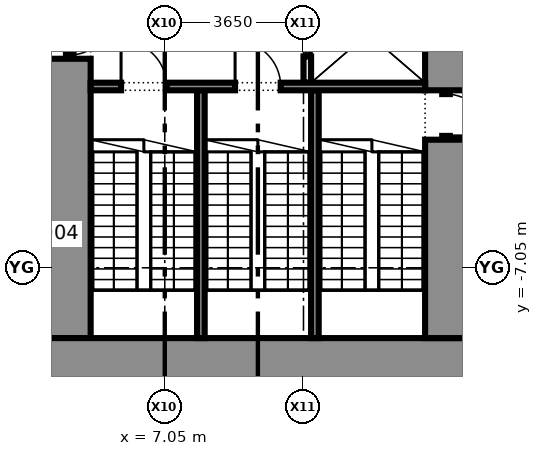
"""IFC4 building model, lengths in metres.
Left out: names, types, materials, properties, quantities, classifications, styles, units other than length and angle.
Written with IfcOpenShell. Run it as: python <this file> out.ifc"""

import sys

from ifc_helpers import new_model, si_unit, direction, frame, frame_2d, origin, place, context, subcontext, project, spatial, rectangle, extrude, element, fill, save


model = new_model("IFC4")
c1 = context("Model", 3, precision=1e-05, world=origin(), true_north=direction((0.0, 1.0)))
c2 = subcontext(c1, "Body", "Model", "MODEL_VIEW")
j1 = project(units=[si_unit("LENGTHUNIT", "METRE"), si_unit("PLANEANGLEUNIT", "RADIAN")], contexts=[c1])
p1 = place(None, origin())
s1 = spatial("IfcSite", under=j1, at=p1, CompositionType="ELEMENT")
p2 = place(p1, origin())
s2 = spatial("IfcBuilding", under=s1, at=p2, CompositionType="ELEMENT")
p3 = place(p2, frame((0.0, 0.0, 6.5)))
s3 = spatial("IfcBuildingStorey", under=s2, at=p3, CompositionType="ELEMENT", Elevation=6.5)
p4 = place(p3, frame((15.0, -9.45, 0.0), z_axis=(0.0, 0.0, 1.0), x_axis=(-1.0, 0.0, 0.0)))
e1 = element("IfcWall", 1, at=p4, inside=s3, PredefinedType="SHEAR", context=c2, shape_type="SweptSolid", body=[
    extrude(rectangle(XDim=11.0, YDim=1.1, at=frame_2d((5.5, 0.0))), origin(), (0.0, 0.0, 1.0), 4.575),
])
p5 = place(p3, frame((14.45, 3.75, 0.0), z_axis=(0.0, 0.0, 1.0), x_axis=(0.0, -1.0, 0.0)))
e2 = element("IfcWall", 2, at=p5, inside=s3, PredefinedType="SHEAR", context=c2, shape_type="SweptSolid", body=[
    extrude(rectangle(XDim=6.13, YDim=1.1, at=frame_2d((3.065, 0.0))), origin(), (0.0, 0.0, 1.0), 4.575),
])
p6 = place(p3, frame((14.45, -2.38, 0.0), z_axis=(0.0, 0.0, 1.0), x_axis=(0.0, -1.0, 0.0)))
e3 = element("IfcWall", 3, at=p6, inside=s3, PredefinedType="SHEAR", context=c2, shape_type="SweptSolid", body=[
    extrude(rectangle(XDim=1.3, YDim=0.2, at=frame_2d((0.65, 0.0))), origin(), (0.0, 0.0, 1.0), 2.4),
])
p7 = place(p6, frame((0.1, 0.0, 0.0)))
e4 = element("IfcOpeningElement", 4, at=p7, cuts=e3, PredefinedType="OPENING", context=c2, shape_type="SweptSolid", body=[
    extrude(rectangle(XDim=1.1, YDim=2.1, at=frame_2d((0.55, 1.05))), frame((0.0, 0.11, 0.0), z_axis=(0.0, -1.0, 0.0), x_axis=(1.0, 0.0, 0.0)), (0.0, 0.0, 1.0), 0.22),
])
p8 = place(p3, frame((14.45, -3.68, 0.0), z_axis=(0.0, 0.0, 1.0), x_axis=(0.0, -1.0, 0.0)))
e5 = element("IfcWall", 5, at=p8, inside=s3, PredefinedType="SHEAR", context=c2, shape_type="SweptSolid", body=[
    extrude(rectangle(XDim=5.22, YDim=1.1, at=frame_2d((2.61, 0.0))), origin(), (0.0, 0.0, 1.0), 4.575),
])
p9 = place(p3, frame((4.55, -0.25, 0.0), z_axis=(0.0, 0.0, 1.0), x_axis=(0.0, -1.0, 0.0)))
e6 = element("IfcWall", 6, at=p9, inside=s3, PredefinedType="PARTITIONING", context=c2, shape_type="SweptSolid", body=[
    extrude(rectangle(XDim=1.3, YDim=0.2, at=frame_2d((0.65, 0.0))), origin(), (0.0, 0.0, 1.0), 2.4),
])
p10 = place(p9, frame((0.1, 0.0, 0.0)))
e7 = element("IfcOpeningElement", 7, at=p10, cuts=e6, PredefinedType="OPENING", context=c2, shape_type="SweptSolid", body=[
    extrude(rectangle(XDim=1.1, YDim=2.1, at=frame_2d((0.55, 1.05))), frame((0.0, 0.11, 0.0), z_axis=(0.0, -1.0, 0.0), x_axis=(1.0, 0.0, 0.0)), (0.0, 0.0, 1.0), 0.22),
])
p11 = place(p3, frame((4.55, -1.55, 0.0), z_axis=(0.0, 0.0, 1.0), x_axis=(0.0, -1.0, 0.0)))
e8 = element("IfcWall", 8, at=p11, inside=s3, PredefinedType="SHEAR", context=c2, shape_type="SweptSolid", body=[
    extrude(rectangle(XDim=7.35, YDim=1.1, at=frame_2d((3.675, 0.0))), origin(), (0.0, 0.0, 1.0), 4.575),
])
p12 = place(p3, frame((10.8, 0.4, 0.0), z_axis=(0.0, 0.0, 1.0), x_axis=(0.0, -1.0, 0.0)))
e9 = element("IfcWall", 9, at=p12, inside=s3, PredefinedType="PARTITIONING", context=c2, shape_type="SweptSolid", body=[
    extrude(rectangle(XDim=2.58, YDim=0.2, at=frame_2d((1.29, 0.0))), origin(), (0.0, 0.0, 1.0), 4.575),
])
p13 = place(p12, frame((0.69, 0.0, 0.0)))
e10 = element("IfcOpeningElement", 10, at=p13, cuts=e9, PredefinedType="OPENING", context=c2, shape_type="SweptSolid", body=[
    extrude(rectangle(XDim=1.2, YDim=2.1, at=frame_2d((0.6, 1.05))), frame((0.0, 0.11, 0.0), z_axis=(0.0, -1.0, 0.0), x_axis=(1.0, 0.0, 0.0)), (0.0, 0.0, 1.0), 0.22),
])
p14 = place(p3, frame((13.9, -2.28, 0.0), z_axis=(0.0, 0.0, 1.0), x_axis=(-1.0, 0.0, 0.0)))
e11 = element("IfcWall", 11, at=p14, inside=s3, PredefinedType="SHEAR", context=c2, shape_type="SweptSolid", body=[
    extrude(rectangle(XDim=8.8, YDim=0.2, at=frame_2d((4.4, 0.0))), origin(), (0.0, 0.0, 1.0), 4.575),
])
p15 = place(p14, frame((3.8, 0.0, 0.0)))
e12 = element("IfcOpeningElement", 12, at=p15, cuts=e11, PredefinedType="OPENING", context=c2, shape_type="SweptSolid", body=[
    extrude(rectangle(XDim=1.2, YDim=2.1, at=frame_2d((0.6, 1.05))), frame((0.0, 0.11, 0.0), z_axis=(0.0, -1.0, 0.0), x_axis=(1.0, 0.0, 0.0)), (0.0, 0.0, 1.0), 0.22),
])
p16 = place(p14, frame((6.8, 0.0, 0.0)))
e13 = element("IfcOpeningElement", 13, at=p16, cuts=e11, PredefinedType="OPENING", context=c2, shape_type="SweptSolid", body=[
    extrude(rectangle(XDim=1.2, YDim=2.1, at=frame_2d((0.6, 1.05))), frame((0.0, 0.11, 0.0), z_axis=(0.0, -1.0, 0.0), x_axis=(1.0, 0.0, 0.0)), (0.0, 0.0, 1.0), 0.22),
])
for number, where, z_axis, x_axis in (
    (14, (11.0, -2.38, 0.0), (0.0, 0.0, 1.0), (0.0, -1.0, 0.0)),
    (15, (8.0, -2.38, 0.0), (0.0, 0.0, 1.0), (0.0, -1.0, 0.0)),
):
    element("IfcWall", number, at=place(p3, frame(where, z_axis=z_axis, x_axis=x_axis)), inside=s3, PredefinedType="SHEAR", context=c2, shape_type="SweptSolid", body=[
        extrude(rectangle(XDim=6.52, YDim=0.2, at=frame_2d((3.26, 0.0))), origin(), (0.0, 0.0, 1.0), 4.575),
    ])
p17 = place(p7, origin())
e16 = element("IfcDoor", 16, at=p17, inside=s3, OperationType="SINGLE_SWING_RIGHT", PredefinedType="DOOR", context=c2, shape_type="SweptSolid", body=[
    extrude(rectangle(XDim=1.1, YDim=2.1, at=frame_2d((0.55, 1.05))), frame((0.0, 0.025, 0.0), z_axis=(0.0, -1.0, 0.0), x_axis=(1.0, 0.0, 0.0)), (0.0, 0.0, 1.0), 0.05),
])
fill(e4, e16)
p18 = place(p10, origin())
e17 = element("IfcDoor", 17, at=p18, inside=s3, OperationType="SINGLE_SWING_LEFT", PredefinedType="DOOR", context=c2, shape_type="SweptSolid", body=[
    extrude(rectangle(XDim=1.1, YDim=2.1, at=frame_2d((0.55, 1.05))), frame((0.0, 0.025, 0.0), z_axis=(0.0, -1.0, 0.0), x_axis=(1.0, 0.0, 0.0)), (0.0, 0.0, 1.0), 0.05),
])
fill(e7, e17)
p19 = place(p13, origin())
e18 = element("IfcDoor", 18, at=p19, inside=s3, OperationType="DOUBLE_DOOR_SLIDING", PredefinedType="DOOR", context=c2, shape_type="SweptSolid", body=[
    extrude(rectangle(XDim=1.2, YDim=2.1, at=frame_2d((0.6, 1.05))), frame((0.0, 0.025, 0.0), z_axis=(0.0, -1.0, 0.0), x_axis=(1.0, 0.0, 0.0)), (0.0, 0.0, 1.0), 0.05),
])
fill(e10, e18)
p20 = place(p15, frame((1.2, 0.0, 0.0), z_axis=(0.0, 0.0, 1.0), x_axis=(-1.0, 0.0, 0.0)))
e19 = element("IfcDoor", 19, at=p20, inside=s3, OperationType="SINGLE_SWING_LEFT", PredefinedType="DOOR", context=c2, shape_type="SweptSolid", body=[
    extrude(rectangle(XDim=1.2, YDim=2.1, at=frame_2d((0.6, 1.05))), frame((0.0, 0.025, 0.0), z_axis=(0.0, -1.0, 0.0), x_axis=(1.0, 0.0, 0.0)), (0.0, 0.0, 1.0), 0.05),
])
fill(e12, e19)
p21 = place(p16, frame((1.2, 0.0, 0.0), z_axis=(0.0, 0.0, 1.0), x_axis=(-1.0, 0.0, 0.0)))
e20 = element("IfcDoor", 20, at=p21, inside=s3, OperationType="SINGLE_SWING_LEFT", PredefinedType="DOOR", context=c2, shape_type="SweptSolid", body=[
    extrude(rectangle(XDim=1.2, YDim=2.1, at=frame_2d((0.6, 1.05))), frame((0.0, 0.025, 0.0), z_axis=(0.0, -1.0, 0.0), x_axis=(1.0, 0.0, 0.0)), (0.0, 0.0, 1.0), 0.05),
])
fill(e13, e20)
save(model, sys.argv[1])
